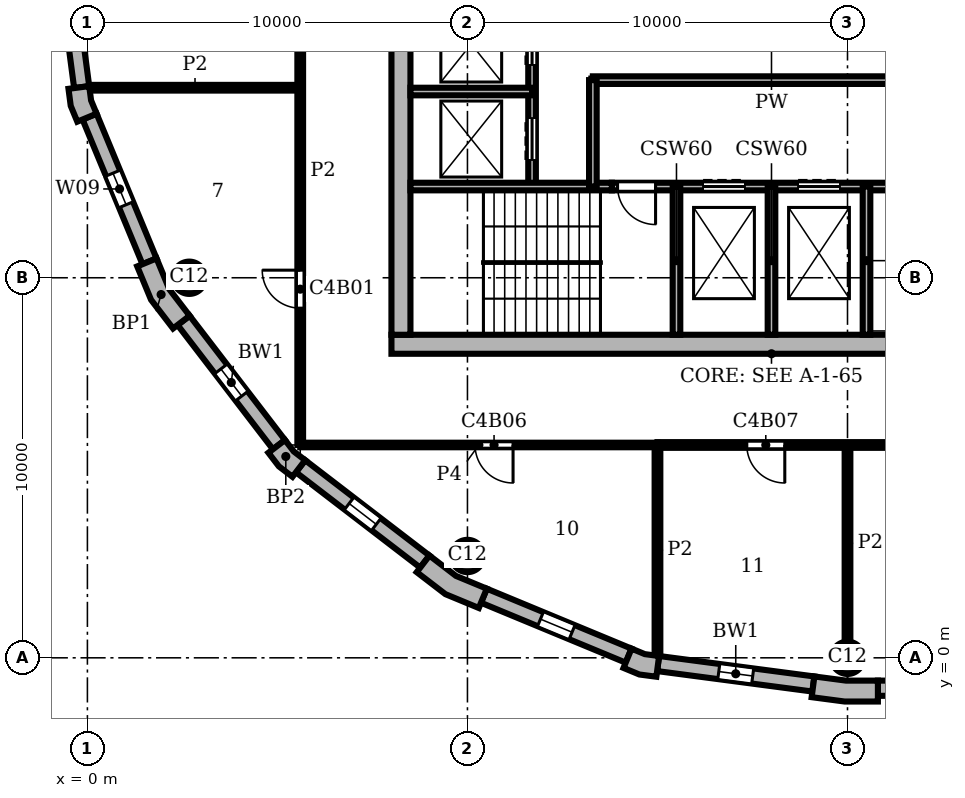
"""IFC4 building model, lengths in metres.
Left out: names, types, materials, properties, quantities, classifications, styles, units other than length and angle.
Written with IfcOpenShell. Run it as: python <this file> out.ifc"""

import sys

from ifc_helpers import new_model, si_unit, direction, frame, frame_2d, origin, origin_2d, place, context, subcontext, project, spatial, polyline, rectangle, circle, outline, extrude, element, fill, save


model = new_model("IFC4")
c1 = context("Model", 3, precision=1e-05, world=origin(), true_north=direction((0.0, 1.0)))
c2 = subcontext(c1, "Body", "Model", "MODEL_VIEW")
j1 = project(units=[si_unit("LENGTHUNIT", "METRE"), si_unit("PLANEANGLEUNIT", "RADIAN")], contexts=[c1])
p1 = place(None, origin())
s1 = spatial("IfcSite", under=j1, at=p1, CompositionType="ELEMENT")
p2 = place(p1, origin())
s2 = spatial("IfcBuilding", under=s1, at=p2, CompositionType="ELEMENT")
p3 = place(p2, frame((0.0, 0.0, 282.6)))
s3 = spatial("IfcBuildingStorey", under=s2, at=p3, CompositionType="ELEMENT", Elevation=282.6)
for number, where, z_axis, x_axis in (
    (1, (20.0, 0.0, 0.0), (0.0, 0.0, 1.0), (1.0, 0.0, 0.0)),
    (2, (2.679, 10.0, 0.0), (0.0, 0.0, 1.0), (1.0, 0.0, 0.0)),
    (3, (10.0, 2.679, 0.0), (0.0, 0.0, 1.0), (1.0, 0.0, 0.0)),
):
    element("IfcColumn", number, at=place(p3, frame(where, z_axis=z_axis, x_axis=x_axis)), inside=s3, PredefinedType="COLUMN", context=c2, shape_type="SweptSolid", body=[
        extrude(circle(Radius=0.425, at=origin_2d()), origin(), (0.0, 0.0, 1.0), 3.9),
    ])
p4 = place(p3, frame((8.0, 8.25, 0.0), z_axis=(0.0, 0.0, 1.0), x_axis=(1.0, 0.0, 0.0)))
e4 = element("IfcWall", 4, at=p4, inside=s3, PredefinedType="SHEAR", context=c2, shape_type="SweptSolid", body=[
    extrude(rectangle(XDim=20.0, YDim=0.5, at=frame_2d((10.0, 0.0))), origin(), (0.0, 0.0, 1.0), 3.9),
])
p5 = place(p3, frame((8.25, 27.5, 0.0), z_axis=(0.0, 0.0, 1.0), x_axis=(0.0, -1.0, 0.0)))
e5 = element("IfcWall", 5, at=p5, inside=s3, PredefinedType="SHEAR", context=c2, shape_type="SweptSolid", body=[
    extrude(rectangle(XDim=19.0, YDim=0.5, at=frame_2d((9.5, 0.0))), origin(), (0.0, 0.0, 1.0), 3.9),
])
p6 = place(p3, origin())
e6 = element("IfcWall", 6, at=p6, inside=s3, PredefinedType="SOLIDWALL", context=c2, shape_type="SweptSolid", body=[
    extrude(outline(polyline([(19.076, -0.887), (19.057, -1.036), (19.925, -1.15), (20.8, -1.15), (20.8, -1.0), (20.8, -0.6), (19.961, -0.6), (19.128, -0.49), (19.076, -0.887)])), origin(), (0.0, 0.0, 1.0), 3.9),
])
e7 = element("IfcWall", 7, at=p6, inside=s3, PredefinedType="SOLIDWALL", context=c2, shape_type="SweptSolid", body=[
    extrude(outline(polyline([(-0.349, 14.99), (-0.498, 14.971), (-0.439, 14.523), (-0.266, 14.106), (-0.128, 14.164), (0.242, 14.317), (0.097, 14.667), (0.047, 15.043), (-0.349, 14.99)])), origin(), (0.0, 0.0, 1.0), 3.9),
])
e8 = element("IfcWall", 8, at=p6, inside=s3, PredefinedType="SOLIDWALL", context=c2, shape_type="SweptSolid", body=[
    extrude(outline(polyline([(1.449, 10.356), (1.311, 10.299), (1.675, 9.42), (2.254, 8.665), (2.373, 8.757), (2.69, 9.0), (2.155, 9.698), (1.819, 10.51), (1.449, 10.356)])), origin(), (0.0, 0.0, 1.0), 3.9),
])
e9 = element("IfcWall", 9, at=p6, inside=s3, PredefinedType="SOLIDWALL", context=c2, shape_type="SweptSolid", body=[
    extrude(outline(polyline([(4.882, 5.487), (4.763, 5.396), (5.038, 5.038), (5.396, 4.763), (5.487, 4.882), (5.731, 5.199), (5.43, 5.43), (5.199, 5.731), (4.882, 5.487)])), origin(), (0.0, 0.0, 1.0), 3.9),
])
e10 = element("IfcWall", 10, at=p6, inside=s3, PredefinedType="SOLIDWALL", context=c2, shape_type="SweptSolid", body=[
    extrude(outline(polyline([(8.757, 2.373), (8.665, 2.254), (9.42, 1.675), (10.299, 1.311), (10.356, 1.449), (10.51, 1.819), (9.698, 2.155), (9.0, 2.69), (8.757, 2.373)])), origin(), (0.0, 0.0, 1.0), 3.9),
])
e11 = element("IfcWall", 11, at=p6, inside=s3, PredefinedType="SOLIDWALL", context=c2, shape_type="SweptSolid", body=[
    extrude(outline(polyline([(14.164, -0.128), (14.106, -0.266), (14.523, -0.439), (14.971, -0.498), (14.99, -0.349), (15.043, 0.047), (14.667, 0.097), (14.317, 0.242), (14.164, -0.128)])), origin(), (0.0, 0.0, 1.0), 3.9),
])
p7 = place(p3, frame((20.8, -0.8, 0.0), z_axis=(0.0, 0.0, 1.0), x_axis=(1.0, 0.0, 0.0)))
e12 = element("IfcWall", 12, at=p7, inside=s3, PredefinedType="SOLIDWALL", context=c2, shape_type="SweptSolid", body=[
    extrude(rectangle(XDim=18.4, YDim=0.4, at=frame_2d((9.2, 0.0))), origin(), (0.0, 0.0, 1.0), 3.9),
])
p8 = place(p7, frame((3.75, 0.0, 0.9)))
e13 = element("IfcOpeningElement", 13, at=p8, cuts=e12, PredefinedType="OPENING", context=c2, shape_type="SweptSolid", body=[
    extrude(rectangle(XDim=0.9, YDim=2.35, at=frame_2d((0.45, 1.175))), frame((0.0, 0.21, 0.0), z_axis=(0.0, -1.0, 0.0), x_axis=(1.0, 0.0, 0.0)), (0.0, 0.0, 1.0), 0.42),
])
p9 = place(p7, frame((13.75, 0.0, 0.9)))
e14 = element("IfcOpeningElement", 14, at=p9, cuts=e12, PredefinedType="OPENING", context=c2, shape_type="SweptSolid", body=[
    extrude(rectangle(XDim=0.9, YDim=2.35, at=frame_2d((0.45, 1.175))), frame((0.0, 0.21, 0.0), z_axis=(0.0, -1.0, 0.0), x_axis=(1.0, 0.0, 0.0)), (0.0, 0.0, 1.0), 0.42),
])
p10 = place(p3, frame((-0.689, 19.102, 0.0), z_axis=(0.0, 0.0, 1.0), x_axis=(0.130514280502, -0.991446429508, 0.0)))
e15 = element("IfcWall", 15, at=p10, inside=s3, PredefinedType="SOLIDWALL", context=c2, shape_type="SweptSolid", body=[
    extrude(rectangle(XDim=4.121, YDim=0.4, at=frame_2d((2.061, 0.0))), origin(), (0.0, 0.0, 1.0), 3.9),
])
p11 = place(p10, frame((1.611, 0.0, 0.9)))
e16 = element("IfcOpeningElement", 16, at=p11, cuts=e15, PredefinedType="OPENING", context=c2, shape_type="SweptSolid", body=[
    extrude(rectangle(XDim=0.9, YDim=2.35, at=frame_2d((0.45, 1.175))), frame((0.0, 0.21, 0.0), z_axis=(0.0, -1.0, 0.0), x_axis=(1.0, 0.0, 0.0)), (0.0, 0.0, 1.0), 0.42),
])
p12 = place(p3, frame((0.057, 14.24, 0.0), z_axis=(0.0, 0.0, 1.0), x_axis=(0.382721546029, -0.923863744394, 0.0)))
e17 = element("IfcWall", 17, at=p12, inside=s3, PredefinedType="SOLIDWALL", context=c2, shape_type="SweptSolid", body=[
    extrude(rectangle(XDim=4.121, YDim=0.4, at=frame_2d((2.061, 0.0))), origin(), (0.0, 0.0, 1.0), 3.9),
])
p13 = place(p12, frame((1.611, 0.0, 0.9)))
e18 = element("IfcOpeningElement", 18, at=p13, cuts=e17, PredefinedType="OPENING", context=c2, shape_type="SweptSolid", body=[
    extrude(rectangle(XDim=0.9, YDim=2.35, at=frame_2d((0.45, 1.175))), frame((0.0, 0.21, 0.0), z_axis=(0.0, -1.0, 0.0), x_axis=(1.0, 0.0, 0.0)), (0.0, 0.0, 1.0), 0.42),
])
p14 = place(p3, frame((2.532, 8.878, 0.0), z_axis=(0.0, 0.0, 1.0), x_axis=(0.608759824817, -0.793354571229, 0.0)))
e19 = element("IfcWall", 19, at=p14, inside=s3, PredefinedType="SOLIDWALL", context=c2, shape_type="SweptSolid", body=[
    extrude(rectangle(XDim=4.121, YDim=0.4, at=frame_2d((2.061, 0.0))), origin(), (0.0, 0.0, 1.0), 3.9),
])
p15 = place(p14, frame((1.611, 0.0, 0.9)))
e20 = element("IfcOpeningElement", 20, at=p15, cuts=e19, PredefinedType="OPENING", context=c2, shape_type="SweptSolid", body=[
    extrude(rectangle(XDim=0.9, YDim=2.35, at=frame_2d((0.45, 1.175))), frame((0.0, 0.21, 0.0), z_axis=(0.0, -1.0, 0.0), x_axis=(1.0, 0.0, 0.0)), (0.0, 0.0, 1.0), 0.42),
])
p16 = place(p3, frame((5.609, 5.041, 0.0), z_axis=(0.0, 0.0, 1.0), x_axis=(0.793354571229, -0.608759824817, 0.0)))
e21 = element("IfcWall", 21, at=p16, inside=s3, PredefinedType="SOLIDWALL", context=c2, shape_type="SweptSolid", body=[
    extrude(rectangle(XDim=4.121, YDim=0.4, at=frame_2d((2.061, 0.0))), origin(), (0.0, 0.0, 1.0), 3.9),
])
p17 = place(p16, frame((1.611, 0.0, 0.9)))
e22 = element("IfcOpeningElement", 22, at=p17, cuts=e21, PredefinedType="OPENING", context=c2, shape_type="SweptSolid", body=[
    extrude(rectangle(XDim=0.9, YDim=2.35, at=frame_2d((0.45, 1.175))), frame((0.0, 0.21, 0.0), z_axis=(0.0, -1.0, 0.0), x_axis=(1.0, 0.0, 0.0)), (0.0, 0.0, 1.0), 0.42),
])
p18 = place(p3, frame((10.433, 1.634, 0.0), z_axis=(0.0, 0.0, 1.0), x_axis=(0.923863744394, -0.382721546029, 0.0)))
e23 = element("IfcWall", 23, at=p18, inside=s3, PredefinedType="SOLIDWALL", context=c2, shape_type="SweptSolid", body=[
    extrude(rectangle(XDim=4.121, YDim=0.4, at=frame_2d((2.061, 0.0))), origin(), (0.0, 0.0, 1.0), 3.9),
])
p19 = place(p18, frame((1.611, 0.0, 0.9)))
e24 = element("IfcOpeningElement", 24, at=p19, cuts=e23, PredefinedType="OPENING", context=c2, shape_type="SweptSolid", body=[
    extrude(rectangle(XDim=0.9, YDim=2.35, at=frame_2d((0.45, 1.175))), frame((0.0, 0.21, 0.0), z_axis=(0.0, -1.0, 0.0), x_axis=(1.0, 0.0, 0.0)), (0.0, 0.0, 1.0), 0.42),
])
p20 = place(p3, frame((15.017, -0.151, 0.0), z_axis=(0.0, 0.0, 1.0), x_axis=(0.991446429508, -0.130514280502, 0.0)))
e25 = element("IfcWall", 25, at=p20, inside=s3, PredefinedType="SOLIDWALL", context=c2, shape_type="SweptSolid", body=[
    extrude(rectangle(XDim=4.121, YDim=0.4, at=frame_2d((2.061, 0.0))), origin(), (0.0, 0.0, 1.0), 3.9),
])
p21 = place(p20, frame((1.611, 0.0, 0.9)))
e26 = element("IfcOpeningElement", 26, at=p21, cuts=e25, PredefinedType="OPENING", context=c2, shape_type="SweptSolid", body=[
    extrude(rectangle(XDim=0.9, YDim=2.35, at=frame_2d((0.45, 1.175))), frame((0.0, 0.21, 0.0), z_axis=(0.0, -1.0, 0.0), x_axis=(1.0, 0.0, 0.0)), (0.0, 0.0, 1.0), 0.42),
])
p22 = place(p3, frame((8.5, 12.4, 0.0), z_axis=(0.0, 0.0, 1.0), x_axis=(1.0, 0.0, 0.0)))
e27 = element("IfcWall", 27, at=p22, inside=s3, PredefinedType="SHEAR", context=c2, shape_type="SweptSolid", body=[
    extrude(rectangle(XDim=5.3, YDim=0.2, at=frame_2d((2.65, 0.0))), origin(), (0.0, 0.0, 1.0), 3.58),
])
p23 = place(p3, frame((13.8, 12.4, 0.0), z_axis=(0.0, 0.0, 1.0), x_axis=(1.0, 0.0, 0.0)))
e28 = element("IfcWall", 28, at=p23, inside=s3, PredefinedType="SHEAR", context=c2, shape_type="SweptSolid", body=[
    extrude(rectangle(XDim=13.7, YDim=0.2, at=frame_2d((6.85, 0.0))), origin(), (0.0, 0.0, 1.0), 3.58),
])
p24 = place(p23, frame((2.4, 0.0, 0.0)))
e29 = element("IfcOpeningElement", 29, at=p24, cuts=e28, PredefinedType="OPENING", context=c2, shape_type="SweptSolid", body=[
    extrude(rectangle(XDim=1.1, YDim=2.1, at=frame_2d((0.55, 1.05))), frame((0.0, 0.11, 0.0), z_axis=(0.0, -1.0, 0.0), x_axis=(1.0, 0.0, 0.0)), (0.0, 0.0, 1.0), 0.22),
])
p25 = place(p23, frame((4.9, 0.0, 0.0)))
e30 = element("IfcOpeningElement", 30, at=p25, cuts=e28, PredefinedType="OPENING", context=c2, shape_type="SweptSolid", body=[
    extrude(rectangle(XDim=1.1, YDim=2.1, at=frame_2d((0.55, 1.05))), frame((0.0, 0.11, 0.0), z_axis=(0.0, -1.0, 0.0), x_axis=(1.0, 0.0, 0.0)), (0.0, 0.0, 1.0), 0.22),
])
p26 = place(p23, frame((0.15, 0.0, 0.0)))
e31 = element("IfcOpeningElement", 31, at=p26, cuts=e28, PredefinedType="OPENING", context=c2, shape_type="SweptSolid", body=[
    extrude(rectangle(XDim=1.0, YDim=2.1, at=frame_2d((0.5, 1.05))), frame((0.0, 0.11, 0.0), z_axis=(0.0, -1.0, 0.0), x_axis=(1.0, 0.0, 0.0)), (0.0, 0.0, 1.0), 0.22),
])
p27 = place(p3, frame((8.5, 14.9, 0.0), z_axis=(0.0, 0.0, 1.0), x_axis=(1.0, 0.0, 0.0)))
e32 = element("IfcWall", 32, at=p27, inside=s3, PredefinedType="SHEAR", context=c2, shape_type="SweptSolid", body=[
    extrude(rectangle(XDim=3.2, YDim=0.2, at=frame_2d((1.6, 0.0))), origin(), (0.0, 0.0, 1.0), 3.58),
])
p28 = place(p3, frame((13.3, 15.2, 0.0), z_axis=(0.0, 0.0, 1.0), x_axis=(1.0, 0.0, 0.0)))
e33 = element("IfcWall", 33, at=p28, inside=s3, PredefinedType="SHEAR", context=c2, shape_type="SweptSolid", body=[
    extrude(rectangle(XDim=9.7, YDim=0.2, at=frame_2d((4.85, 0.0))), origin(), (0.0, 0.0, 1.0), 3.58),
])
p29 = place(p3, frame((11.7, 12.4, 0.0), z_axis=(0.0, 0.0, 1.0), x_axis=(0.0, 1.0, 0.0)))
e34 = element("IfcWall", 34, at=p29, inside=s3, PredefinedType="SHEAR", context=c2, shape_type="SweptSolid", body=[
    extrude(rectangle(XDim=11.2, YDim=0.2, at=frame_2d((5.6, 0.0))), origin(), (0.0, 0.0, 1.0), 3.58),
])
p30 = place(p29, frame((0.7, 0.0, 0.0)))
e35 = element("IfcOpeningElement", 35, at=p30, cuts=e34, PredefinedType="OPENING", context=c2, shape_type="SweptSolid", body=[
    extrude(rectangle(XDim=1.1, YDim=2.1, at=frame_2d((0.55, 1.05))), frame((0.0, 0.11, 0.0), z_axis=(0.0, -1.0, 0.0), x_axis=(1.0, 0.0, 0.0)), (0.0, 0.0, 1.0), 0.22),
])
p31 = place(p29, frame((3.2, 0.0, 0.0)))
e36 = element("IfcOpeningElement", 36, at=p31, cuts=e34, PredefinedType="OPENING", context=c2, shape_type="SweptSolid", body=[
    extrude(rectangle(XDim=1.1, YDim=2.1, at=frame_2d((0.55, 1.05))), frame((0.0, 0.11, 0.0), z_axis=(0.0, -1.0, 0.0), x_axis=(1.0, 0.0, 0.0)), (0.0, 0.0, 1.0), 0.22),
])
p32 = place(p29, frame((5.7, 0.0, 0.0)))
e37 = element("IfcOpeningElement", 37, at=p32, cuts=e34, PredefinedType="OPENING", context=c2, shape_type="SweptSolid", body=[
    extrude(rectangle(XDim=1.1, YDim=2.1, at=frame_2d((0.55, 1.05))), frame((0.0, 0.11, 0.0), z_axis=(0.0, -1.0, 0.0), x_axis=(1.0, 0.0, 0.0)), (0.0, 0.0, 1.0), 0.22),
])
p33 = place(p29, frame((8.2, 0.0, 0.0)))
e38 = element("IfcOpeningElement", 38, at=p33, cuts=e34, PredefinedType="OPENING", context=c2, shape_type="SweptSolid", body=[
    extrude(rectangle(XDim=1.1, YDim=2.1, at=frame_2d((0.55, 1.05))), frame((0.0, 0.11, 0.0), z_axis=(0.0, -1.0, 0.0), x_axis=(1.0, 0.0, 0.0)), (0.0, 0.0, 1.0), 0.22),
])
p34 = place(p3, frame((13.3, 12.4, 0.0), z_axis=(0.0, 0.0, 1.0), x_axis=(0.0, 1.0, 0.0)))
e39 = element("IfcWall", 39, at=p34, inside=s3, PredefinedType="SHEAR", context=c2, shape_type="SweptSolid", body=[
    extrude(rectangle(XDim=2.8, YDim=0.2, at=frame_2d((1.4, 0.0))), origin(), (0.0, 0.0, 1.0), 3.58),
])
for number, where, z_axis, x_axis in (
    (40, (15.5, 8.5, 0.0), (0.0, 0.0, 1.0), (0.0, 1.0, 0.0)),
    (41, (18.0, 8.5, 0.0), (0.0, 0.0, 1.0), (0.0, 1.0, 0.0)),
    (42, (20.5, 8.5, 0.0), (0.0, 0.0, 1.0), (0.0, 1.0, 0.0)),
):
    element("IfcWall", number, at=place(p3, frame(where, z_axis=z_axis, x_axis=x_axis)), inside=s3, PredefinedType="SHEAR", context=c2, shape_type="SweptSolid", body=[
        extrude(rectangle(XDim=3.9, YDim=0.2, at=frame_2d((1.95, 0.0))), origin(), (0.0, 0.0, 1.0), 3.58),
    ])
p35 = place(p3, frame((5.6, 5.6, 0.0), z_axis=(0.0, 0.0, 1.0), x_axis=(0.0, 1.0, 0.0)))
e43 = element("IfcWall", 43, at=p35, inside=s3, PredefinedType="PARTITIONING", context=c2, shape_type="SweptSolid", body=[
    extrude(rectangle(XDim=14.4, YDim=0.15, at=frame_2d((7.2, 0.0))), origin(), (0.0, 0.0, 1.0), 3.58),
])
p36 = place(p35, frame((3.6, 0.0, 0.0)))
e44 = element("IfcOpeningElement", 44, at=p36, cuts=e43, PredefinedType="OPENING", context=c2, shape_type="SweptSolid", body=[
    extrude(rectangle(XDim=1.0, YDim=2.1, at=frame_2d((0.5, 1.05))), frame((0.0, 0.085, 0.0), z_axis=(0.0, -1.0, 0.0), x_axis=(1.0, 0.0, 0.0)), (0.0, 0.0, 1.0), 0.17),
])
p37 = place(p35, frame((11.25, 0.0, 0.0)))
e45 = element("IfcOpeningElement", 45, at=p37, cuts=e43, PredefinedType="OPENING", context=c2, shape_type="SweptSolid", body=[
    extrude(rectangle(XDim=0.8, YDim=2.1, at=frame_2d((0.4, 1.05))), frame((0.0, 0.085, 0.0), z_axis=(0.0, -1.0, 0.0), x_axis=(1.0, 0.0, 0.0)), (0.0, 0.0, 1.0), 0.17),
])
p38 = place(p3, frame((15.0, 0.063, 0.0), z_axis=(0.0, 0.0, 1.0), x_axis=(0.0, 1.0, 0.0)))
e46 = element("IfcWall", 46, at=p38, inside=s3, PredefinedType="PARTITIONING", context=c2, shape_type="SweptSolid", body=[
    extrude(rectangle(XDim=5.537, YDim=0.15, at=frame_2d((2.769, 0.0))), origin(), (0.0, 0.0, 1.0), 3.58),
])
p39 = place(p3, frame((20.0, 0.425, 0.0), z_axis=(0.0, 0.0, 1.0), x_axis=(0.0, 1.0, 0.0)))
e47 = element("IfcWall", 47, at=p39, inside=s3, PredefinedType="PARTITIONING", context=c2, shape_type="SweptSolid", body=[
    extrude(rectangle(XDim=5.175, YDim=0.15, at=frame_2d((2.587, 0.0))), origin(), (0.0, 0.0, 1.0), 3.58),
])
p40 = place(p3, frame((15.0, 5.6, 0.0), z_axis=(0.0, 0.0, 1.0), x_axis=(1.0, 0.0, 0.0)))
e48 = element("IfcWall", 48, at=p40, inside=s3, PredefinedType="PARTITIONING", context=c2, shape_type="SweptSolid", body=[
    extrude(rectangle(XDim=16.0, YDim=0.15, at=frame_2d((8.0, 0.0))), origin(), (0.0, 0.0, 1.0), 3.58),
])
p41 = place(p40, frame((2.35, 0.0, 0.0)))
e49 = element("IfcOpeningElement", 49, at=p41, cuts=e48, PredefinedType="OPENING", context=c2, shape_type="SweptSolid", body=[
    extrude(rectangle(XDim=1.0, YDim=2.1, at=frame_2d((0.5, 1.05))), frame((0.0, 0.085, 0.0), z_axis=(0.0, -1.0, 0.0), x_axis=(1.0, 0.0, 0.0)), (0.0, 0.0, 1.0), 0.17),
])
p42 = place(p3, frame((0.063, 15.0, 0.0), z_axis=(0.0, 0.0, 1.0), x_axis=(1.0, 0.0, 0.0)))
e50 = element("IfcWall", 50, at=p42, inside=s3, PredefinedType="PARTITIONING", context=c2, shape_type="SweptSolid", body=[
    extrude(rectangle(XDim=5.537, YDim=0.15, at=frame_2d((2.769, 0.0))), origin(), (0.0, 0.0, 1.0), 3.58),
])
p43 = place(p3, frame((5.6, 5.6, 0.0), z_axis=(0.0, 0.0, 1.0), x_axis=(1.0, 0.0, 0.0)))
e51 = element("IfcWall", 51, at=p43, inside=s3, PredefinedType="PARTITIONING", context=c2, shape_type="SweptSolid", body=[
    extrude(rectangle(XDim=9.4, YDim=0.12, at=frame_2d((4.7, 0.0))), origin(), (0.0, 0.0, 1.0), 3.58),
])
p44 = place(p43, frame((4.6, 0.0, 0.0)))
e52 = element("IfcOpeningElement", 52, at=p44, cuts=e51, PredefinedType="OPENING", context=c2, shape_type="SweptSolid", body=[
    extrude(rectangle(XDim=1.0, YDim=2.1, at=frame_2d((0.5, 1.05))), frame((0.0, 0.07, 0.0), z_axis=(0.0, -1.0, 0.0), x_axis=(1.0, 0.0, 0.0)), (0.0, 0.0, 1.0), 0.14),
])
p45 = place(p13, origin())
e53 = element("IfcWindow", 53, at=p45, inside=s3, PartitioningType="SINGLE_PANEL", PredefinedType="WINDOW", context=c2, shape_type="SweptSolid", body=[
    extrude(rectangle(XDim=0.9, YDim=2.35, at=frame_2d((0.45, 1.175))), frame((0.0, 0.16, 0.0), z_axis=(0.0, -1.0, 0.0), x_axis=(1.0, 0.0, 0.0)), (0.0, 0.0, 1.0), 0.06),
])
fill(e18, e53)
p46 = place(p15, origin())
e54 = element("IfcWindow", 54, at=p46, inside=s3, PartitioningType="SINGLE_PANEL", PredefinedType="WINDOW", context=c2, shape_type="SweptSolid", body=[
    extrude(rectangle(XDim=0.9, YDim=2.35, at=frame_2d((0.45, 1.175))), frame((0.0, 0.16, 0.0), z_axis=(0.0, -1.0, 0.0), x_axis=(1.0, 0.0, 0.0)), (0.0, 0.0, 1.0), 0.06),
])
fill(e20, e54)
p47 = place(p17, origin())
e55 = element("IfcWindow", 55, at=p47, inside=s3, PartitioningType="SINGLE_PANEL", PredefinedType="WINDOW", context=c2, shape_type="SweptSolid", body=[
    extrude(rectangle(XDim=0.9, YDim=2.35, at=frame_2d((0.45, 1.175))), frame((0.0, 0.16, 0.0), z_axis=(0.0, -1.0, 0.0), x_axis=(1.0, 0.0, 0.0)), (0.0, 0.0, 1.0), 0.06),
])
fill(e22, e55)
p48 = place(p19, origin())
e56 = element("IfcWindow", 56, at=p48, inside=s3, PartitioningType="SINGLE_PANEL", PredefinedType="WINDOW", context=c2, shape_type="SweptSolid", body=[
    extrude(rectangle(XDim=0.9, YDim=2.35, at=frame_2d((0.45, 1.175))), frame((0.0, 0.16, 0.0), z_axis=(0.0, -1.0, 0.0), x_axis=(1.0, 0.0, 0.0)), (0.0, 0.0, 1.0), 0.06),
])
fill(e24, e56)
p49 = place(p21, origin())
e57 = element("IfcWindow", 57, at=p49, inside=s3, PartitioningType="SINGLE_PANEL", PredefinedType="WINDOW", context=c2, shape_type="SweptSolid", body=[
    extrude(rectangle(XDim=0.9, YDim=2.35, at=frame_2d((0.45, 1.175))), frame((0.0, 0.16, 0.0), z_axis=(0.0, -1.0, 0.0), x_axis=(1.0, 0.0, 0.0)), (0.0, 0.0, 1.0), 0.06),
])
fill(e26, e57)
p50 = place(p30, origin())
e58 = element("IfcDoor", 58, at=p50, inside=s3, OperationType="DOUBLE_DOOR_SLIDING", PredefinedType="DOOR", context=c2, shape_type="SweptSolid", body=[
    extrude(rectangle(XDim=1.1, YDim=2.1, at=frame_2d((0.55, 1.05))), frame((0.0, 0.025, 0.0), z_axis=(0.0, -1.0, 0.0), x_axis=(1.0, 0.0, 0.0)), (0.0, 0.0, 1.0), 0.05),
])
fill(e35, e58)
p51 = place(p31, origin())
e59 = element("IfcDoor", 59, at=p51, inside=s3, OperationType="DOUBLE_DOOR_SLIDING", PredefinedType="DOOR", context=c2, shape_type="SweptSolid", body=[
    extrude(rectangle(XDim=1.1, YDim=2.1, at=frame_2d((0.55, 1.05))), frame((0.0, 0.025, 0.0), z_axis=(0.0, -1.0, 0.0), x_axis=(1.0, 0.0, 0.0)), (0.0, 0.0, 1.0), 0.05),
])
fill(e36, e59)
p52 = place(p24, origin())
e60 = element("IfcDoor", 60, at=p52, inside=s3, OperationType="DOUBLE_DOOR_SLIDING", PredefinedType="DOOR", context=c2, shape_type="SweptSolid", body=[
    extrude(rectangle(XDim=1.1, YDim=2.1, at=frame_2d((0.55, 1.05))), frame((0.0, 0.025, 0.0), z_axis=(0.0, -1.0, 0.0), x_axis=(1.0, 0.0, 0.0)), (0.0, 0.0, 1.0), 0.05),
])
fill(e29, e60)
p53 = place(p25, origin())
e61 = element("IfcDoor", 61, at=p53, inside=s3, OperationType="DOUBLE_DOOR_SLIDING", PredefinedType="DOOR", context=c2, shape_type="SweptSolid", body=[
    extrude(rectangle(XDim=1.1, YDim=2.1, at=frame_2d((0.55, 1.05))), frame((0.0, 0.025, 0.0), z_axis=(0.0, -1.0, 0.0), x_axis=(1.0, 0.0, 0.0)), (0.0, 0.0, 1.0), 0.05),
])
fill(e30, e61)
p54 = place(p26, frame((1.0, 0.0, 0.0), z_axis=(0.0, 0.0, 1.0), x_axis=(-1.0, 0.0, 0.0)))
e62 = element("IfcDoor", 62, at=p54, inside=s3, OperationType="SINGLE_SWING_LEFT", PredefinedType="DOOR", context=c2, shape_type="SweptSolid", body=[
    extrude(rectangle(XDim=1.0, YDim=2.1, at=frame_2d((0.5, 1.05))), frame((0.0, 0.025, 0.0), z_axis=(0.0, -1.0, 0.0), x_axis=(1.0, 0.0, 0.0)), (0.0, 0.0, 1.0), 0.05),
])
fill(e31, e62)
p55 = place(p36, origin())
e63 = element("IfcDoor", 63, at=p55, inside=s3, OperationType="SINGLE_SWING_RIGHT", PredefinedType="DOOR", context=c2, shape_type="SweptSolid", body=[
    extrude(rectangle(XDim=1.0, YDim=2.1, at=frame_2d((0.5, 1.05))), frame((0.0, 0.025, 0.0), z_axis=(0.0, -1.0, 0.0), x_axis=(1.0, 0.0, 0.0)), (0.0, 0.0, 1.0), 0.05),
])
fill(e44, e63)
p56 = place(p44, frame((1.0, 0.0, 0.0), z_axis=(0.0, 0.0, 1.0), x_axis=(-1.0, 0.0, 0.0)))
e64 = element("IfcDoor", 64, at=p56, inside=s3, OperationType="SINGLE_SWING_LEFT", PredefinedType="DOOR", context=c2, shape_type="SweptSolid", body=[
    extrude(rectangle(XDim=1.0, YDim=2.1, at=frame_2d((0.5, 1.05))), frame((0.0, 0.025, 0.0), z_axis=(0.0, -1.0, 0.0), x_axis=(1.0, 0.0, 0.0)), (0.0, 0.0, 1.0), 0.05),
])
fill(e52, e64)
p57 = place(p41, frame((1.0, 0.0, 0.0), z_axis=(0.0, 0.0, 1.0), x_axis=(-1.0, 0.0, 0.0)))
e65 = element("IfcDoor", 65, at=p57, inside=s3, OperationType="SINGLE_SWING_LEFT", PredefinedType="DOOR", context=c2, shape_type="SweptSolid", body=[
    extrude(rectangle(XDim=1.0, YDim=2.1, at=frame_2d((0.5, 1.05))), frame((0.0, 0.025, 0.0), z_axis=(0.0, -1.0, 0.0), x_axis=(1.0, 0.0, 0.0)), (0.0, 0.0, 1.0), 0.05),
])
fill(e49, e65)
save(model, sys.argv[1])
